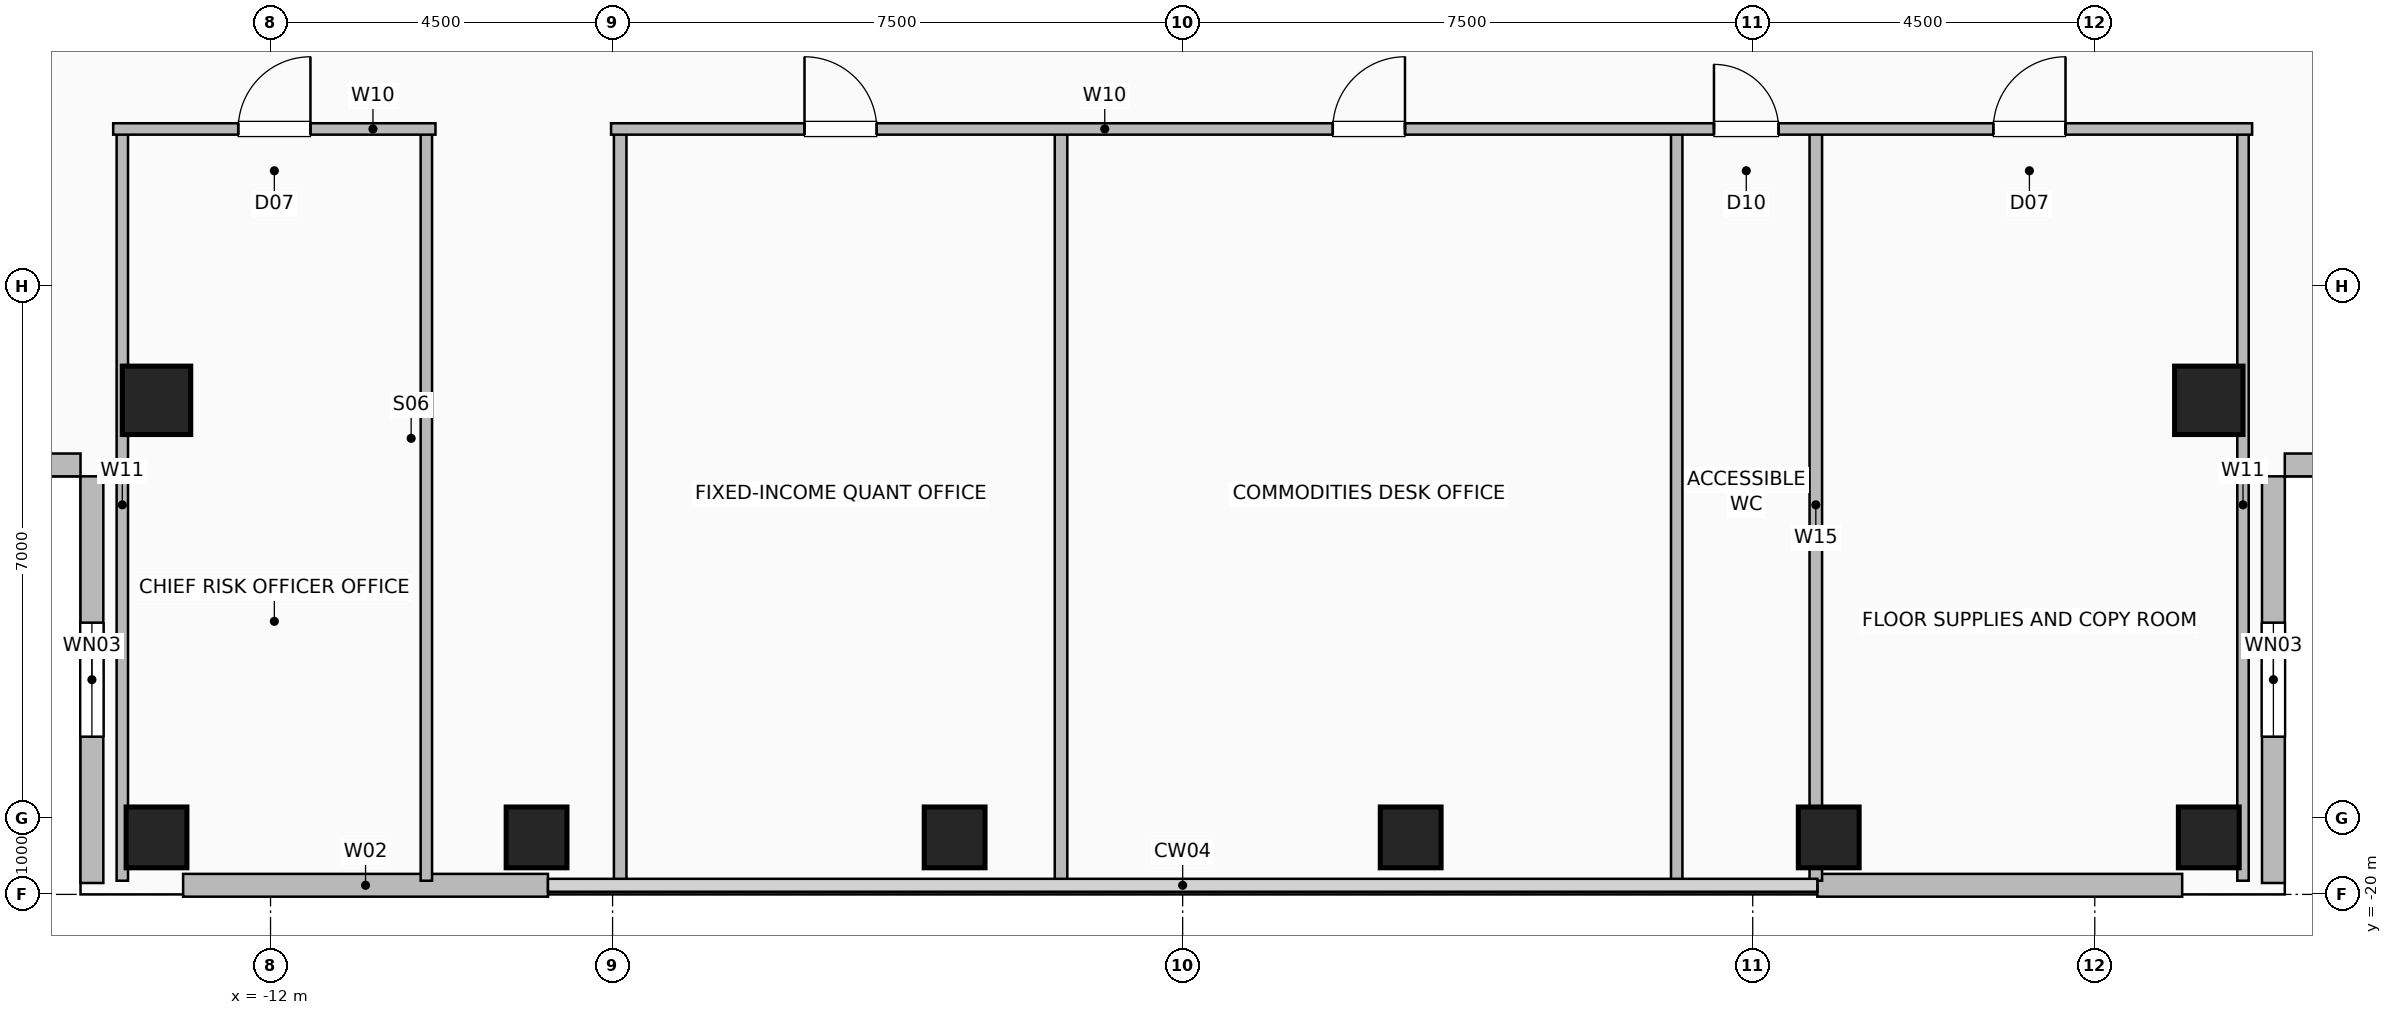
"""IFC4 building model, lengths in metres.
Left out: names, types, materials, properties, quantities, classifications, styles, units other than length and angle.
Written with IfcOpenShell. Run it as: python <this file> out.ifc"""

import sys

from ifc_helpers import new_model, si_unit, direction, frame, frame_2d, origin, origin_2d, place, context, subcontext, project, spatial, rectangle, hollow_rectangle, extrude, element, fill, save


model = new_model("IFC4")
c1 = context("Model", 3, precision=1e-05, world=origin(), true_north=direction((0.0, 1.0)))
c2 = subcontext(c1, "Body", "Model", "MODEL_VIEW")
j1 = project(units=[si_unit("LENGTHUNIT", "METRE"), si_unit("PLANEANGLEUNIT", "RADIAN")], contexts=[c1])
p1 = place(None, origin())
s1 = spatial("IfcSite", under=j1, at=p1, CompositionType="ELEMENT")
p2 = place(p1, origin())
s2 = spatial("IfcBuilding", under=s1, at=p2, CompositionType="ELEMENT")
p3 = place(p2, frame((0.0, 0.0, 213.0)))
s3 = spatial("IfcBuildingStorey", under=s2, at=p3, CompositionType="ELEMENT", Elevation=213.0)
for number, where, z_axis, x_axis in (
    (1, (-13.5, -19.25, 0.0), (0.0, 0.0, 1.0), (1.0, 0.0, 0.0)),
    (2, (-8.5, -19.25, 0.0), (0.0, 0.0, 1.0), (1.0, 0.0, 0.0)),
    (3, (-3.0, -19.25, 0.0), (0.0, 0.0, 1.0), (1.0, 0.0, 0.0)),
    (4, (3.0, -19.25, 0.0), (0.0, 0.0, 1.0), (1.0, 0.0, 0.0)),
    (5, (8.5, -19.25, 0.0), (0.0, 0.0, 1.0), (1.0, 0.0, 0.0)),
    (6, (13.5, -19.25, 0.0), (0.0, 0.0, 1.0), (1.0, 0.0, 0.0)),
):
    element("IfcColumn", number, at=place(p3, frame(where, z_axis=z_axis, x_axis=x_axis)), inside=s3, PredefinedType="COLUMN", context=c2, shape_type="SweptSolid", body=[
        extrude(hollow_rectangle(XDim=0.8, YDim=0.8, WallThickness=0.04, at=origin_2d()), origin(), (0.0, 0.0, 1.0), 3.6),
    ])
for number, where, z_axis, x_axis in (
    (7, (-13.5, -13.5, 0.0), (0.0, 0.0, 1.0), (1.0, 0.0, 0.0)),
    (8, (13.5, -13.5, 0.0), (0.0, 0.0, 1.0), (1.0, 0.0, 0.0)),
):
    element("IfcColumn", number, at=place(p3, frame(where, z_axis=z_axis, x_axis=x_axis)), inside=s3, PredefinedType="COLUMN", context=c2, shape_type="SweptSolid", body=[
        extrude(hollow_rectangle(XDim=0.9, YDim=0.9, WallThickness=0.045, at=origin_2d()), origin(), (0.0, 0.0, 1.0), 3.6),
    ])
for number, where, z_axis, x_axis in (
    (9, (-13.15, -19.88, 0.0), (0.0, 0.0, 1.0), (1.0, 0.0, 0.0)),
    (10, (8.35, -19.88, 0.0), (0.0, 0.0, 1.0), (1.0, 0.0, 0.0)),
):
    element("IfcWall", number, at=place(p3, frame(where, z_axis=z_axis, x_axis=x_axis)), inside=s3, PredefinedType="SOLIDWALL", context=c2, shape_type="SweptSolid", body=[
        extrude(rectangle(XDim=4.8, YDim=0.3, at=frame_2d((2.4, 0.0))), origin(), (0.0, 0.0, 1.0), 3.36),
    ])
p4 = place(p3, frame((-14.35, -19.85, 0.0), z_axis=(0.0, 0.0, 1.0), x_axis=(0.0, 1.0, 0.0)))
e11 = element("IfcWall", 11, at=p4, inside=s3, PredefinedType="SOLIDWALL", context=c2, shape_type="SweptSolid", body=[
    extrude(rectangle(XDim=5.35, YDim=0.3, at=frame_2d((2.675, 0.0))), origin(), (0.0, 0.0, 1.0), 3.36),
])
p5 = place(p4, frame((1.925, 0.0, 0.9)))
e12 = element("IfcOpeningElement", 12, at=p5, cuts=e11, PredefinedType="OPENING", context=c2, shape_type="SweptSolid", body=[
    extrude(rectangle(XDim=1.5, YDim=1.8, at=frame_2d((0.75, 0.9))), frame((0.0, 0.16, 0.0), z_axis=(0.0, -1.0, 0.0), x_axis=(1.0, 0.0, 0.0)), (0.0, 0.0, 1.0), 0.32),
])
p6 = place(p3, frame((-19.85, -14.35, 0.0), z_axis=(0.0, 0.0, 1.0), x_axis=(1.0, 0.0, 0.0)))
e13 = element("IfcWall", 13, at=p6, inside=s3, PredefinedType="SOLIDWALL", context=c2, shape_type="SweptSolid", body=[
    extrude(rectangle(XDim=5.35, YDim=0.3, at=frame_2d((2.675, 0.0))), origin(), (0.0, 0.0, 1.0), 3.36),
])
p7 = place(p3, frame((14.35, -19.85, 0.0), z_axis=(0.0, 0.0, 1.0), x_axis=(0.0, 1.0, 0.0)))
e14 = element("IfcWall", 14, at=p7, inside=s3, PredefinedType="SOLIDWALL", context=c2, shape_type="SweptSolid", body=[
    extrude(rectangle(XDim=5.35, YDim=0.3, at=frame_2d((2.675, 0.0))), origin(), (0.0, 0.0, 1.0), 3.36),
])
p8 = place(p7, frame((1.925, 0.0, 0.9)))
e15 = element("IfcOpeningElement", 15, at=p8, cuts=e14, PredefinedType="OPENING", context=c2, shape_type="SweptSolid", body=[
    extrude(rectangle(XDim=1.5, YDim=1.8, at=frame_2d((0.75, 0.9))), frame((0.0, 0.16, 0.0), z_axis=(0.0, -1.0, 0.0), x_axis=(1.0, 0.0, 0.0)), (0.0, 0.0, 1.0), 0.32),
])
p9 = place(p3, frame((19.85, -14.35, 0.0), z_axis=(0.0, 0.0, 1.0), x_axis=(-1.0, 0.0, 0.0)))
e16 = element("IfcWall", 16, at=p9, inside=s3, PredefinedType="SOLIDWALL", context=c2, shape_type="SweptSolid", body=[
    extrude(rectangle(XDim=5.35, YDim=0.3, at=frame_2d((2.675, 0.0))), origin(), (0.0, 0.0, 1.0), 3.36),
])
for number, where, z_axis, x_axis in (
    (17, (-13.95, -19.82, 0.0), (0.0, 0.0, 1.0), (0.0, 1.0, 0.0)),
    (18, (-9.95, -19.82, 0.0), (0.0, 0.0, 1.0), (0.0, 1.0, 0.0)),
):
    element("IfcWall", number, at=place(p3, frame(where, z_axis=z_axis, x_axis=x_axis)), inside=s3, PredefinedType="PARTITIONING", context=c2, shape_type="SweptSolid", body=[
        extrude(rectangle(XDim=9.89, YDim=0.15, at=frame_2d((4.945, 0.0))), origin(), (0.0, 0.0, 1.0), 3.36),
    ])
p10 = place(p3, frame((-14.07, -9.93, 0.0), z_axis=(0.0, 0.0, 1.0), x_axis=(1.0, 0.0, 0.0)))
e19 = element("IfcWall", 19, at=p10, inside=s3, PredefinedType="PARTITIONING", context=c2, shape_type="SweptSolid", body=[
    extrude(rectangle(XDim=4.24, YDim=0.15, at=frame_2d((2.12, 0.0))), origin(), (0.0, 0.0, 1.0), 3.36),
])
p11 = place(p10, frame((1.645, 0.0, 0.0)))
e20 = element("IfcOpeningElement", 20, at=p11, cuts=e19, PredefinedType="OPENING", context=c2, shape_type="SweptSolid", body=[
    extrude(rectangle(XDim=0.95, YDim=2.06, at=frame_2d((0.475, 1.03))), frame((0.0, 0.085, 0.0), z_axis=(0.0, -1.0, 0.0), x_axis=(1.0, 0.0, 0.0)), (0.0, 0.0, 1.0), 0.17),
])
for number, where, z_axis, x_axis in (
    (21, (8.33, -19.82, 0.0), (0.0, 0.0, 1.0), (0.0, 1.0, 0.0)),
    (22, (-7.4, -19.82, 0.0), (0.0, 0.0, 1.0), (0.0, 1.0, 0.0)),
    (23, (-1.6, -19.82, 0.0), (0.0, 0.0, 1.0), (0.0, 1.0, 0.0)),
):
    element("IfcWall", number, at=place(p3, frame(where, z_axis=z_axis, x_axis=x_axis)), inside=s3, PredefinedType="PLUMBINGWALL", context=c2, shape_type="SweptSolid", body=[
        extrude(rectangle(XDim=9.89, YDim=0.165, at=frame_2d((4.945, 0.0))), origin(), (0.0, 0.0, 1.0), 3.36),
    ])
for number, where, z_axis, x_axis in (
    (24, (6.5, -19.82, 0.0), (0.0, 0.0, 1.0), (0.0, 1.0, 0.0)),
    (25, (13.95, -19.82, 0.0), (0.0, 0.0, 1.0), (0.0, 1.0, 0.0)),
):
    element("IfcWall", number, at=place(p3, frame(where, z_axis=z_axis, x_axis=x_axis)), inside=s3, PredefinedType="PARTITIONING", context=c2, shape_type="SweptSolid", body=[
        extrude(rectangle(XDim=9.89, YDim=0.15, at=frame_2d((4.945, 0.0))), origin(), (0.0, 0.0, 1.0), 3.36),
    ])
p12 = place(p3, frame((-7.52, -9.93, 0.0), z_axis=(0.0, 0.0, 1.0), x_axis=(1.0, 0.0, 0.0)))
e26 = element("IfcWall", 26, at=p12, inside=s3, PredefinedType="PARTITIONING", context=c2, shape_type="SweptSolid", body=[
    extrude(rectangle(XDim=21.59, YDim=0.15, at=frame_2d((10.795, 0.0))), origin(), (0.0, 0.0, 1.0), 3.36),
])
p13 = place(p12, frame((2.545, 0.0, 0.0)))
e27 = element("IfcOpeningElement", 27, at=p13, cuts=e26, PredefinedType="OPENING", context=c2, shape_type="SweptSolid", body=[
    extrude(rectangle(XDim=0.95, YDim=2.06, at=frame_2d((0.475, 1.03))), frame((0.0, 0.085, 0.0), z_axis=(0.0, -1.0, 0.0), x_axis=(1.0, 0.0, 0.0)), (0.0, 0.0, 1.0), 0.17),
])
p14 = place(p12, frame((9.495, 0.0, 0.0)))
e28 = element("IfcOpeningElement", 28, at=p14, cuts=e26, PredefinedType="OPENING", context=c2, shape_type="SweptSolid", body=[
    extrude(rectangle(XDim=0.95, YDim=2.06, at=frame_2d((0.475, 1.03))), frame((0.0, 0.085, 0.0), z_axis=(0.0, -1.0, 0.0), x_axis=(1.0, 0.0, 0.0)), (0.0, 0.0, 1.0), 0.17),
])
p15 = place(p12, frame((14.51, 0.0, 0.0)))
e29 = element("IfcOpeningElement", 29, at=p15, cuts=e26, PredefinedType="OPENING", context=c2, shape_type="SweptSolid", body=[
    extrude(rectangle(XDim=0.85, YDim=2.05, at=frame_2d((0.425, 1.025))), frame((0.0, 0.085, 0.0), z_axis=(0.0, -1.0, 0.0), x_axis=(1.0, 0.0, 0.0)), (0.0, 0.0, 1.0), 0.17),
])
p16 = place(p12, frame((18.185, 0.0, 0.0)))
e30 = element("IfcOpeningElement", 30, at=p16, cuts=e26, PredefinedType="OPENING", context=c2, shape_type="SweptSolid", body=[
    extrude(rectangle(XDim=0.95, YDim=2.06, at=frame_2d((0.475, 1.03))), frame((0.0, 0.085, 0.0), z_axis=(0.0, -1.0, 0.0), x_axis=(1.0, 0.0, 0.0)), (0.0, 0.0, 1.0), 0.17),
])
p17 = place(p5, origin())
e31 = element("IfcWindow", 31, at=p17, inside=s3, PartitioningType="SINGLE_PANEL", PredefinedType="WINDOW", context=c2, shape_type="SweptSolid", body=[
    extrude(rectangle(XDim=1.5, YDim=1.8, at=frame_2d((0.75, 0.9))), frame((0.0, 0.03, 0.0), z_axis=(0.0, -1.0, 0.0), x_axis=(1.0, 0.0, 0.0)), (0.0, 0.0, 1.0), 0.06),
])
fill(e12, e31)
p18 = place(p8, origin())
e32 = element("IfcWindow", 32, at=p18, inside=s3, PartitioningType="SINGLE_PANEL", PredefinedType="WINDOW", context=c2, shape_type="SweptSolid", body=[
    extrude(rectangle(XDim=1.5, YDim=1.8, at=frame_2d((0.75, 0.9))), frame((0.0, 0.03, 0.0), z_axis=(0.0, -1.0, 0.0), x_axis=(1.0, 0.0, 0.0)), (0.0, 0.0, 1.0), 0.06),
])
fill(e15, e32)
p19 = place(p11, origin())
e33 = element("IfcDoor", 33, at=p19, inside=s3, OperationType="SINGLE_SWING_RIGHT", PredefinedType="DOOR", context=c2, shape_type="SweptSolid", body=[
    extrude(rectangle(XDim=0.95, YDim=2.06, at=frame_2d((0.475, 1.03))), frame((0.0, 0.025, 0.0), z_axis=(0.0, -1.0, 0.0), x_axis=(1.0, 0.0, 0.0)), (0.0, 0.0, 1.0), 0.05),
])
fill(e20, e33)
p20 = place(p13, origin())
e34 = element("IfcDoor", 34, at=p20, inside=s3, OperationType="SINGLE_SWING_LEFT", PredefinedType="DOOR", context=c2, shape_type="SweptSolid", body=[
    extrude(rectangle(XDim=0.95, YDim=2.06, at=frame_2d((0.475, 1.03))), frame((0.0, 0.025, 0.0), z_axis=(0.0, -1.0, 0.0), x_axis=(1.0, 0.0, 0.0)), (0.0, 0.0, 1.0), 0.05),
])
fill(e27, e34)
p21 = place(p14, origin())
e35 = element("IfcDoor", 35, at=p21, inside=s3, OperationType="SINGLE_SWING_RIGHT", PredefinedType="DOOR", context=c2, shape_type="SweptSolid", body=[
    extrude(rectangle(XDim=0.95, YDim=2.06, at=frame_2d((0.475, 1.03))), frame((0.0, 0.025, 0.0), z_axis=(0.0, -1.0, 0.0), x_axis=(1.0, 0.0, 0.0)), (0.0, 0.0, 1.0), 0.05),
])
fill(e28, e35)
p22 = place(p15, origin())
e36 = element("IfcDoor", 36, at=p22, inside=s3, OperationType="SINGLE_SWING_LEFT", PredefinedType="DOOR", context=c2, shape_type="SweptSolid", body=[
    extrude(rectangle(XDim=0.85, YDim=2.05, at=frame_2d((0.425, 1.025))), frame((0.0, 0.025, 0.0), z_axis=(0.0, -1.0, 0.0), x_axis=(1.0, 0.0, 0.0)), (0.0, 0.0, 1.0), 0.05),
])
fill(e29, e36)
p23 = place(p16, origin())
e37 = element("IfcDoor", 37, at=p23, inside=s3, OperationType="SINGLE_SWING_RIGHT", PredefinedType="DOOR", context=c2, shape_type="SweptSolid", body=[
    extrude(rectangle(XDim=0.95, YDim=2.06, at=frame_2d((0.475, 1.03))), frame((0.0, 0.025, 0.0), z_axis=(0.0, -1.0, 0.0), x_axis=(1.0, 0.0, 0.0)), (0.0, 0.0, 1.0), 0.05),
])
fill(e30, e37)
save(model, sys.argv[1])
